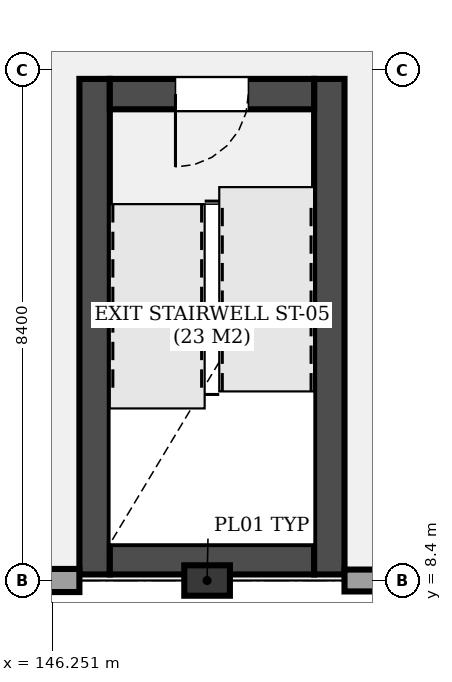
"""IFC4 building model, lengths in metres.
Left out: names, types, materials, properties, quantities, classifications, styles, units other than length and angle.
Written with IfcOpenShell. Run it as: python <this file> out.ifc"""

import sys

from ifc_helpers import new_model, si_unit, direction, frame, frame_2d, origin, origin_2d, place, context, subcontext, project, spatial, rectangle, extrude, element, fill, save


model = new_model("IFC4")
c1 = context("Model", 3, precision=1e-05, world=origin(), true_north=direction((0.0, 1.0)))
c2 = subcontext(c1, "Body", "Model", "MODEL_VIEW")
j1 = project(units=[si_unit("LENGTHUNIT", "METRE"), si_unit("PLANEANGLEUNIT", "RADIAN")], contexts=[c1])
p1 = place(None, origin())
s1 = spatial("IfcSite", under=j1, at=p1, CompositionType="ELEMENT")
p2 = place(p1, origin())
s2 = spatial("IfcBuilding", under=s1, at=p2, CompositionType="ELEMENT")
p3 = place(p2, frame((0.0, 0.0, 13.5)))
s3 = spatial("IfcBuildingStorey", under=s2, at=p3, CompositionType="ELEMENT", Elevation=13.5)
p4 = place(p3, frame((148.8, 8.4, 0.0), z_axis=(0.0, 0.0, 1.0), x_axis=(1.0, 0.0, 0.0)))
e1 = element("IfcColumn", 1, at=p4, inside=s3, PredefinedType="PILASTER", context=c2, shape_type="SweptSolid", body=[
    extrude(rectangle(XDim=0.75, YDim=0.5, at=origin_2d()), origin(), (0.0, 0.0, 1.0), 4.3),
])
p5 = place(p3, frame((146.95, 16.65, 0.0), z_axis=(0.0, 0.0, 1.0), x_axis=(0.0, -1.0, 0.0)))
e2 = element("IfcWall", 2, at=p5, inside=s3, PredefinedType="SHEAR", context=c2, shape_type="SweptSolid", body=[
    extrude(rectangle(XDim=8.15, YDim=0.5, at=frame_2d((4.075, 0.0))), origin(), (0.0, 0.0, 1.0), 4.3),
])
p6 = place(p3, frame((147.2, 8.75, 0.0), z_axis=(0.0, 0.0, 1.0), x_axis=(1.0, 0.0, 0.0)))
e3 = element("IfcWall", 3, at=p6, inside=s3, PredefinedType="SHEAR", context=c2, shape_type="SweptSolid", body=[
    extrude(rectangle(XDim=3.36, YDim=0.5, at=frame_2d((1.68, 0.0))), origin(), (0.0, 0.0, 1.0), 4.3),
])
p7 = place(p3, frame((150.81, 8.5, 0.0), z_axis=(0.0, 0.0, 1.0), x_axis=(0.0, 1.0, 0.0)))
e4 = element("IfcWall", 4, at=p7, inside=s3, PredefinedType="SHEAR", context=c2, shape_type="SweptSolid", body=[
    extrude(rectangle(XDim=8.15, YDim=0.5, at=frame_2d((4.075, 0.0))), origin(), (0.0, 0.0, 1.0), 4.3),
])
p8 = place(p3, frame((150.56, 16.4, 0.0), z_axis=(0.0, 0.0, 1.0), x_axis=(-1.0, 0.0, 0.0)))
e5 = element("IfcWall", 5, at=p8, inside=s3, PredefinedType="SHEAR", context=c2, shape_type="SweptSolid", body=[
    extrude(rectangle(XDim=3.36, YDim=0.5, at=frame_2d((1.68, 0.0))), origin(), (0.0, 0.0, 1.0), 4.3),
])
p9 = place(p8, frame((1.08, 0.0, 0.0)))
e6 = element("IfcOpeningElement", 6, at=p9, cuts=e5, PredefinedType="OPENING", context=c2, shape_type="SweptSolid", body=[
    extrude(rectangle(XDim=1.2, YDim=2.2, at=frame_2d((0.6, 1.1))), frame((0.0, 0.26, 0.0), z_axis=(0.0, -1.0, 0.0), x_axis=(1.0, 0.0, 0.0)), (0.0, 0.0, 1.0), 0.52),
])
p10 = place(p3, frame((153.6, 8.4, 0.0), z_axis=(0.0, 0.0, 1.0), x_axis=(-1.0, 0.0, 0.0)))
e7 = element("IfcWall", 7, at=p10, inside=s3, PredefinedType="SOLIDWALL", context=c2, shape_type="SweptSolid", body=[
    extrude(rectangle(XDim=2.54, YDim=0.36, at=frame_2d((1.27, 0.0))), origin(), (0.0, 0.0, 1.0), 3.49),
])
p11 = place(p3, frame((146.7, 8.4, 0.0), z_axis=(0.0, 0.0, 1.0), x_axis=(-1.0, 0.0, 0.0)))
e8 = element("IfcWall", 8, at=p11, inside=s3, PredefinedType="SOLIDWALL", context=c2, shape_type="SweptSolid", body=[
    extrude(rectangle(XDim=2.7, YDim=0.38, at=frame_2d((1.35, 0.0))), origin(), (0.0, 0.0, 1.0), 3.49),
])
p12 = place(p9, origin())
e9 = element("IfcDoor", 9, at=p12, inside=s3, OperationType="SINGLE_SWING_RIGHT", PredefinedType="DOOR", context=c2, shape_type="SweptSolid", body=[
    extrude(rectangle(XDim=1.2, YDim=2.2, at=frame_2d((0.6, 1.1))), frame((0.0, 0.025, 0.0), z_axis=(0.0, -1.0, 0.0), x_axis=(1.0, 0.0, 0.0)), (0.0, 0.0, 1.0), 0.05),
])
fill(e6, e9)
save(model, sys.argv[1])
